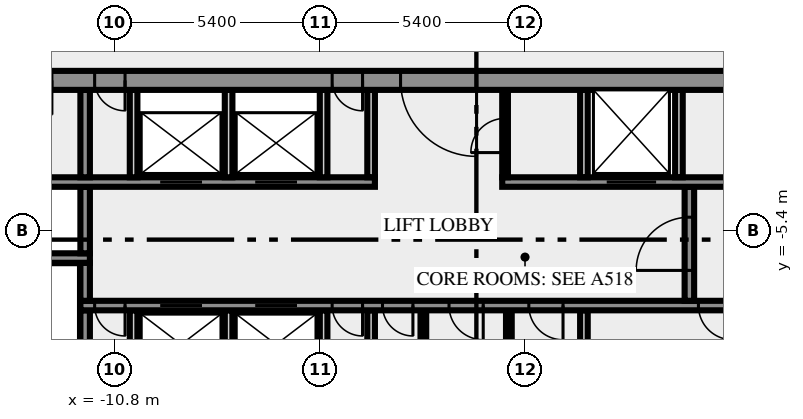
"""IFC4 building model, lengths in metres.
Left out: names, types, materials, properties, quantities, classifications, styles, units other than length and angle.
Written with IfcOpenShell. Run it as: python <this file> out.ifc"""

import sys

from ifc_helpers import new_model, si_unit, direction, frame, frame_2d, origin, place, context, subcontext, project, spatial, rectangle, extrude, element, fill, save


model = new_model("IFC4")
c1 = context("Model", 3, precision=1e-05, world=origin(), true_north=direction((0.0, 1.0)))
c2 = subcontext(c1, "Body", "Model", "MODEL_VIEW")
j1 = project(units=[si_unit("LENGTHUNIT", "METRE"), si_unit("PLANEANGLEUNIT", "RADIAN")], contexts=[c1])
p1 = place(None, origin())
s1 = spatial("IfcSite", under=j1, at=p1, CompositionType="ELEMENT")
p2 = place(p1, origin())
s2 = spatial("IfcBuilding", under=s1, at=p2, CompositionType="ELEMENT")
p3 = place(p2, frame((0.0, 0.0, 311.0)))
s3 = spatial("IfcBuildingStorey", under=s2, at=p3, CompositionType="ELEMENT", Elevation=311.0)
p4 = place(p3, frame((-11.575, -10.5, 0.0), z_axis=(0.0, 0.0, 1.0), x_axis=(0.0, 1.0, 0.0)))
e1 = element("IfcWall", 1, at=p4, inside=s3, PredefinedType="SHEAR", context=c2, shape_type="SweptSolid", body=[
    extrude(rectangle(XDim=3.0, YDim=0.25, at=frame_2d((1.5, 0.0))), origin(), (0.0, 0.0, 1.0), 3.65),
])
for number, where, z_axis, x_axis in (
    (2, (-10.3, -10.5, 0.0), (0.0, 0.0, 1.0), (0.0, 1.0, 0.0)),
    (3, (-7.8, -10.5, 0.0), (0.0, 0.0, 1.0), (0.0, 1.0, 0.0)),
    (4, (-5.3, -10.5, 0.0), (0.0, 0.0, 1.0), (0.0, 1.0, 0.0)),
    (5, (-4.05, -10.5, 0.0), (0.0, 0.0, 1.0), (0.0, 1.0, 0.0)),
):
    element("IfcWall", number, at=place(p3, frame(where, z_axis=z_axis, x_axis=x_axis)), inside=s3, PredefinedType="SOLIDWALL", context=c2, shape_type="SweptSolid", body=[
        extrude(rectangle(XDim=3.0, YDim=0.2, at=frame_2d((1.5, 0.0))), origin(), (0.0, 0.0, 1.0), 3.65),
    ])
for number, where, z_axis, x_axis in (
    (6, (-2.675, -10.5, 0.0), (0.0, 0.0, 1.0), (0.0, 1.0, 0.0)),
    (7, (-0.425, -10.5, 0.0), (0.0, 0.0, 1.0), (0.0, 1.0, 0.0)),
):
    element("IfcWall", number, at=place(p3, frame(where, z_axis=z_axis, x_axis=x_axis)), inside=s3, PredefinedType="PARTITIONING", context=c2, shape_type="SweptSolid", body=[
        extrude(rectangle(XDim=3.0, YDim=0.15, at=frame_2d((1.5, 0.0))), origin(), (0.0, 0.0, 1.0), 3.65),
    ])
p5 = place(p3, frame((1.55, -10.5, 0.0), z_axis=(0.0, 0.0, 1.0), x_axis=(0.0, 1.0, 0.0)))
e8 = element("IfcWall", 8, at=p5, inside=s3, PredefinedType="SOLIDWALL", context=c2, shape_type="SweptSolid", body=[
    extrude(rectangle(XDim=3.0, YDim=0.2, at=frame_2d((1.5, 0.0))), origin(), (0.0, 0.0, 1.0), 3.65),
])
p6 = place(p3, frame((11.7, -7.375, 0.0), z_axis=(0.0, 0.0, 1.0), x_axis=(-1.0, 0.0, 0.0)))
e9 = element("IfcWall", 9, at=p6, inside=s3, PredefinedType="SHEAR", context=c2, shape_type="SweptSolid", body=[
    extrude(rectangle(XDim=23.4, YDim=0.25, at=frame_2d((11.7, 0.0))), origin(), (0.0, 0.0, 1.0), 3.65),
])
p7 = place(p6, frame((22.225, 0.0, 0.0)))
e10 = element("IfcOpeningElement", 10, at=p7, cuts=e9, PredefinedType="OPENING", context=c2, shape_type="SweptSolid", body=[
    extrude(rectangle(XDim=0.8, YDim=2.1, at=frame_2d((0.4, 1.05))), frame((0.0, 0.135, 0.0), z_axis=(0.0, -1.0, 0.0), x_axis=(1.0, 0.0, 0.0)), (0.0, 0.0, 1.0), 0.27),
])
p8 = place(p6, frame((20.2, 0.0, 0.0)))
e11 = element("IfcOpeningElement", 11, at=p8, cuts=e9, PredefinedType="OPENING", context=c2, shape_type="SweptSolid", body=[
    extrude(rectangle(XDim=1.1, YDim=2.1, at=frame_2d((0.55, 1.05))), frame((0.0, 0.135, 0.0), z_axis=(0.0, -1.0, 0.0), x_axis=(1.0, 0.0, 0.0)), (0.0, 0.0, 1.0), 0.27),
])
p9 = place(p6, frame((17.7, 0.0, 0.0)))
e12 = element("IfcOpeningElement", 12, at=p9, cuts=e9, PredefinedType="OPENING", context=c2, shape_type="SweptSolid", body=[
    extrude(rectangle(XDim=1.1, YDim=2.1, at=frame_2d((0.55, 1.05))), frame((0.0, 0.135, 0.0), z_axis=(0.0, -1.0, 0.0), x_axis=(1.0, 0.0, 0.0)), (0.0, 0.0, 1.0), 0.27),
])
p10 = place(p6, frame((15.975, 0.0, 0.0)))
e13 = element("IfcOpeningElement", 13, at=p10, cuts=e9, PredefinedType="OPENING", context=c2, shape_type="SweptSolid", body=[
    extrude(rectangle(XDim=0.8, YDim=2.1, at=frame_2d((0.4, 1.05))), frame((0.0, 0.135, 0.0), z_axis=(0.0, -1.0, 0.0), x_axis=(1.0, 0.0, 0.0)), (0.0, 0.0, 1.0), 0.27),
])
p11 = place(p6, frame((14.65, 0.0, 0.0)))
e14 = element("IfcOpeningElement", 14, at=p11, cuts=e9, PredefinedType="OPENING", context=c2, shape_type="SweptSolid", body=[
    extrude(rectangle(XDim=0.8, YDim=2.1, at=frame_2d((0.4, 1.05))), frame((0.0, 0.135, 0.0), z_axis=(0.0, -1.0, 0.0), x_axis=(1.0, 0.0, 0.0)), (0.0, 0.0, 1.0), 0.27),
])
p12 = place(p6, frame((12.8, 0.0, 0.0)))
e15 = element("IfcOpeningElement", 15, at=p12, cuts=e9, PredefinedType="OPENING", context=c2, shape_type="SweptSolid", body=[
    extrude(rectangle(XDim=0.9, YDim=2.1, at=frame_2d((0.45, 1.05))), frame((0.0, 0.135, 0.0), z_axis=(0.0, -1.0, 0.0), x_axis=(1.0, 0.0, 0.0)), (0.0, 0.0, 1.0), 0.27),
])
p13 = place(p6, frame((10.7, 0.0, 0.0)))
e16 = element("IfcOpeningElement", 16, at=p13, cuts=e9, PredefinedType="OPENING", context=c2, shape_type="SweptSolid", body=[
    extrude(rectangle(XDim=0.9, YDim=2.1, at=frame_2d((0.45, 1.05))), frame((0.0, 0.135, 0.0), z_axis=(0.0, -1.0, 0.0), x_axis=(1.0, 0.0, 0.0)), (0.0, 0.0, 1.0), 0.27),
])
p14 = place(p6, frame((6.237, 0.0, 0.0)))
e17 = element("IfcOpeningElement", 17, at=p14, cuts=e9, PredefinedType="OPENING", context=c2, shape_type="SweptSolid", body=[
    extrude(rectangle(XDim=0.9, YDim=2.1, at=frame_2d((0.45, 1.05))), frame((0.0, 0.135, 0.0), z_axis=(0.0, -1.0, 0.0), x_axis=(1.0, 0.0, 0.0)), (0.0, 0.0, 1.0), 0.27),
])
p15 = place(p6, frame((1.263, 0.0, 0.0)))
e18 = element("IfcOpeningElement", 18, at=p15, cuts=e9, PredefinedType="OPENING", context=c2, shape_type="SweptSolid", body=[
    extrude(rectangle(XDim=0.9, YDim=2.1, at=frame_2d((0.45, 1.05))), frame((0.0, 0.135, 0.0), z_axis=(0.0, -1.0, 0.0), x_axis=(1.0, 0.0, 0.0)), (0.0, 0.0, 1.0), 0.27),
])
p16 = place(p3, frame((-11.575, -7.25, 0.0), z_axis=(0.0, 0.0, 1.0), x_axis=(0.0, 1.0, 0.0)))
e19 = element("IfcWall", 19, at=p16, inside=s3, PredefinedType="SHEAR", context=c2, shape_type="SweptSolid", body=[
    extrude(rectangle(XDim=1.0, YDim=0.25, at=frame_2d((0.5, 0.0))), origin(), (0.0, 0.0, 1.0), 3.65),
])
p17 = place(p3, frame((4.325, -7.25, 0.0), z_axis=(0.0, 0.0, 1.0), x_axis=(0.0, 1.0, 0.0)))
e20 = element("IfcWall", 20, at=p17, inside=s3, PredefinedType="SHEAR", context=c2, shape_type="SweptSolid", body=[
    extrude(rectangle(XDim=3.0, YDim=0.25, at=frame_2d((1.5, 0.0))), origin(), (0.0, 0.0, 1.0), 3.65),
])
p18 = place(p17, frame((0.8, 0.0, 0.0)))
e21 = element("IfcOpeningElement", 21, at=p18, cuts=e20, PredefinedType="OPENING", context=c2, shape_type="SweptSolid", body=[
    extrude(rectangle(XDim=1.4, YDim=2.1, at=frame_2d((0.7, 1.05))), frame((0.0, 0.135, 0.0), z_axis=(0.0, -1.0, 0.0), x_axis=(1.0, 0.0, 0.0)), (0.0, 0.0, 1.0), 0.27),
])
p19 = place(p3, frame((-11.45, -6.125, 0.0), z_axis=(0.0, 0.0, 1.0), x_axis=(-1.0, 0.0, 0.0)))
e22 = element("IfcWall", 22, at=p19, inside=s3, PredefinedType="SHEAR", context=c2, shape_type="SweptSolid", body=[
    extrude(rectangle(XDim=8.05, YDim=0.25, at=frame_2d((4.025, 0.0))), origin(), (0.0, 0.0, 1.0), 3.65),
])
p20 = place(p19, frame((6.2, 0.0, 0.0)))
e23 = element("IfcOpeningElement", 23, at=p20, cuts=e22, PredefinedType="OPENING", context=c2, shape_type="SweptSolid", body=[
    extrude(rectangle(XDim=1.8, YDim=2.1, at=frame_2d((0.9, 1.05))), frame((0.0, 0.135, 0.0), z_axis=(0.0, -1.0, 0.0), x_axis=(1.0, 0.0, 0.0)), (0.0, 0.0, 1.0), 0.27),
])
p21 = place(p3, frame((-11.575, -6.0, 0.0), z_axis=(0.0, 0.0, 1.0), x_axis=(0.0, 1.0, 0.0)))
e24 = element("IfcWall", 24, at=p21, inside=s3, PredefinedType="SHEAR", context=c2, shape_type="SweptSolid", body=[
    extrude(rectangle(XDim=1.75, YDim=0.25, at=frame_2d((0.875, 0.0))), origin(), (0.0, 0.0, 1.0), 3.65),
])
p22 = place(p3, frame((-14.35, -4.125, 0.0), z_axis=(0.0, 0.0, 1.0), x_axis=(1.0, 0.0, 0.0)))
e25 = element("IfcWall", 25, at=p22, inside=s3, PredefinedType="SHEAR", context=c2, shape_type="SweptSolid", body=[
    extrude(rectangle(XDim=10.4, YDim=0.25, at=frame_2d((5.2, 0.0))), origin(), (0.0, 0.0, 1.0), 3.65),
])
p23 = place(p22, frame((4.75, 0.0, 0.0)))
e26 = element("IfcOpeningElement", 26, at=p23, cuts=e25, PredefinedType="OPENING", context=c2, shape_type="SweptSolid", body=[
    extrude(rectangle(XDim=1.1, YDim=2.1, at=frame_2d((0.55, 1.05))), frame((0.0, 0.135, 0.0), z_axis=(0.0, -1.0, 0.0), x_axis=(1.0, 0.0, 0.0)), (0.0, 0.0, 1.0), 0.27),
])
p24 = place(p22, frame((7.25, 0.0, 0.0)))
e27 = element("IfcOpeningElement", 27, at=p24, cuts=e25, PredefinedType="OPENING", context=c2, shape_type="SweptSolid", body=[
    extrude(rectangle(XDim=1.1, YDim=2.1, at=frame_2d((0.55, 1.05))), frame((0.0, 0.135, 0.0), z_axis=(0.0, -1.0, 0.0), x_axis=(1.0, 0.0, 0.0)), (0.0, 0.0, 1.0), 0.27),
])
p25 = place(p3, frame((-0.6, -4.125, 0.0), z_axis=(0.0, 0.0, 1.0), x_axis=(1.0, 0.0, 0.0)))
e28 = element("IfcWall", 28, at=p25, inside=s3, PredefinedType="SHEAR", context=c2, shape_type="SweptSolid", body=[
    extrude(rectangle(XDim=14.95, YDim=0.25, at=frame_2d((7.475, 0.0))), origin(), (0.0, 0.0, 1.0), 3.65),
])
p26 = place(p25, frame((2.75, 0.0, 0.0)))
e29 = element("IfcOpeningElement", 29, at=p26, cuts=e28, PredefinedType="OPENING", context=c2, shape_type="SweptSolid", body=[
    extrude(rectangle(XDim=1.3, YDim=2.1, at=frame_2d((0.65, 1.05))), frame((0.0, 0.135, 0.0), z_axis=(0.0, -1.0, 0.0), x_axis=(1.0, 0.0, 0.0)), (0.0, 0.0, 1.0), 0.27),
])
p27 = place(p3, frame((-11.575, -4.0, 0.0), z_axis=(0.0, 0.0, 1.0), x_axis=(0.0, 1.0, 0.0)))
e30 = element("IfcWall", 30, at=p27, inside=s3, PredefinedType="SHEAR", context=c2, shape_type="SweptSolid", body=[
    extrude(rectangle(XDim=2.3, YDim=0.25, at=frame_2d((1.15, 0.0))), origin(), (0.0, 0.0, 1.0), 3.65),
])
for number, where, z_axis, x_axis in (
    (31, (-10.3, -4.0, 0.0), (0.0, 0.0, 1.0), (0.0, 1.0, 0.0)),
    (32, (-7.8, -4.0, 0.0), (0.0, 0.0, 1.0), (0.0, 1.0, 0.0)),
    (33, (-5.3, -4.0, 0.0), (0.0, 0.0, 1.0), (0.0, 1.0, 0.0)),
    (34, (-4.05, -4.0, 0.0), (0.0, 0.0, 1.0), (0.0, 1.0, 0.0)),
):
    element("IfcWall", number, at=place(p3, frame(where, z_axis=z_axis, x_axis=x_axis)), inside=s3, PredefinedType="SOLIDWALL", context=c2, shape_type="SweptSolid", body=[
        extrude(rectangle(XDim=2.3, YDim=0.2, at=frame_2d((1.15, 0.0))), origin(), (0.0, 0.0, 1.0), 3.65),
    ])
p28 = place(p3, frame((-0.525, -4.0, 0.0), z_axis=(0.0, 0.0, 1.0), x_axis=(0.0, 1.0, 0.0)))
e35 = element("IfcWall", 35, at=p28, inside=s3, PredefinedType="PARTITIONING", context=c2, shape_type="SweptSolid", body=[
    extrude(rectangle(XDim=2.3, YDim=0.15, at=frame_2d((1.15, 0.0))), origin(), (0.0, 0.0, 1.0), 3.65),
])
p29 = place(p28, frame((0.65, 0.0, 0.0)))
e36 = element("IfcOpeningElement", 36, at=p29, cuts=e35, PredefinedType="OPENING", context=c2, shape_type="SweptSolid", body=[
    extrude(rectangle(XDim=0.9, YDim=2.1, at=frame_2d((0.45, 1.05))), frame((0.0, 0.085, 0.0), z_axis=(0.0, -1.0, 0.0), x_axis=(1.0, 0.0, 0.0)), (0.0, 0.0, 1.0), 0.17),
])
for number, where, z_axis, x_axis in (
    (37, (1.55, -4.0, 0.0), (0.0, 0.0, 1.0), (0.0, 1.0, 0.0)),
    (38, (4.05, -4.0, 0.0), (0.0, 0.0, 1.0), (0.0, 1.0, 0.0)),
):
    element("IfcWall", number, at=place(p3, frame(where, z_axis=z_axis, x_axis=x_axis)), inside=s3, PredefinedType="SOLIDWALL", context=c2, shape_type="SweptSolid", body=[
        extrude(rectangle(XDim=2.3, YDim=0.2, at=frame_2d((1.15, 0.0))), origin(), (0.0, 0.0, 1.0), 3.65),
    ])
p30 = place(p3, frame((20.49, -1.45, 0.0), z_axis=(0.0, 0.0, 1.0), x_axis=(-1.0, 0.0, 0.0)))
e39 = element("IfcWall", 39, at=p30, inside=s3, PredefinedType="SHEAR", context=c2, shape_type="SweptSolid", body=[
    extrude(rectangle(XDim=40.98, YDim=0.5, at=frame_2d((20.49, 0.0))), origin(), (0.0, 0.0, 1.0), 3.65),
])
p31 = place(p30, frame((38.14, 0.0, 0.0)))
e40 = element("IfcOpeningElement", 40, at=p31, cuts=e39, PredefinedType="OPENING", context=c2, shape_type="SweptSolid", body=[
    extrude(rectangle(XDim=1.8, YDim=2.1, at=frame_2d((0.9, 1.05))), frame((0.0, 0.26, 0.0), z_axis=(0.0, -1.0, 0.0), x_axis=(1.0, 0.0, 0.0)), (0.0, 0.0, 1.0), 0.52),
])
p32 = place(p30, frame((35.89, 0.0, 0.0)))
e41 = element("IfcOpeningElement", 41, at=p32, cuts=e39, PredefinedType="OPENING", context=c2, shape_type="SweptSolid", body=[
    extrude(rectangle(XDim=0.9, YDim=2.1, at=frame_2d((0.45, 1.05))), frame((0.0, 0.26, 0.0), z_axis=(0.0, -1.0, 0.0), x_axis=(1.0, 0.0, 0.0)), (0.0, 0.0, 1.0), 0.52),
])
p33 = place(p30, frame((32.94, 0.0, 0.0)))
e42 = element("IfcOpeningElement", 42, at=p33, cuts=e39, PredefinedType="OPENING", context=c2, shape_type="SweptSolid", body=[
    extrude(rectangle(XDim=0.9, YDim=2.1, at=frame_2d((0.45, 1.05))), frame((0.0, 0.26, 0.0), z_axis=(0.0, -1.0, 0.0), x_axis=(1.0, 0.0, 0.0)), (0.0, 0.0, 1.0), 0.52),
])
p34 = place(p30, frame((31.015, 0.0, 0.0)))
e43 = element("IfcOpeningElement", 43, at=p34, cuts=e39, PredefinedType="OPENING", context=c2, shape_type="SweptSolid", body=[
    extrude(rectangle(XDim=0.8, YDim=2.1, at=frame_2d((0.4, 1.05))), frame((0.0, 0.26, 0.0), z_axis=(0.0, -1.0, 0.0), x_axis=(1.0, 0.0, 0.0)), (0.0, 0.0, 1.0), 0.52),
])
p35 = place(p30, frame((24.765, 0.0, 0.0)))
e44 = element("IfcOpeningElement", 44, at=p35, cuts=e39, PredefinedType="OPENING", context=c2, shape_type="SweptSolid", body=[
    extrude(rectangle(XDim=0.8, YDim=2.1, at=frame_2d((0.4, 1.05))), frame((0.0, 0.26, 0.0), z_axis=(0.0, -1.0, 0.0), x_axis=(1.0, 0.0, 0.0)), (0.0, 0.0, 1.0), 0.52),
])
p36 = place(p30, frame((21.765, 0.0, 0.0)))
e45 = element("IfcOpeningElement", 45, at=p36, cuts=e39, PredefinedType="OPENING", context=c2, shape_type="SweptSolid", body=[
    extrude(rectangle(XDim=2.0, YDim=2.1, at=frame_2d((1.0, 1.05))), frame((0.0, 0.26, 0.0), z_axis=(0.0, -1.0, 0.0), x_axis=(1.0, 0.0, 0.0)), (0.0, 0.0, 1.0), 0.52),
])
p37 = place(p30, frame((12.24, 0.0, 0.0)))
e46 = element("IfcOpeningElement", 46, at=p37, cuts=e39, PredefinedType="OPENING", context=c2, shape_type="SweptSolid", body=[
    extrude(rectangle(XDim=0.9, YDim=2.1, at=frame_2d((0.45, 1.05))), frame((0.0, 0.26, 0.0), z_axis=(0.0, -1.0, 0.0), x_axis=(1.0, 0.0, 0.0)), (0.0, 0.0, 1.0), 0.52),
])
p38 = place(p30, frame((7.14, 0.0, 0.0)))
e47 = element("IfcOpeningElement", 47, at=p38, cuts=e39, PredefinedType="OPENING", context=c2, shape_type="SweptSolid", body=[
    extrude(rectangle(XDim=0.9, YDim=2.1, at=frame_2d((0.45, 1.05))), frame((0.0, 0.26, 0.0), z_axis=(0.0, -1.0, 0.0), x_axis=(1.0, 0.0, 0.0)), (0.0, 0.0, 1.0), 0.52),
])
p39 = place(p30, frame((5.028, 0.0, 0.0)))
e48 = element("IfcOpeningElement", 48, at=p39, cuts=e39, PredefinedType="OPENING", context=c2, shape_type="SweptSolid", body=[
    extrude(rectangle(XDim=0.8, YDim=2.1, at=frame_2d((0.4, 1.05))), frame((0.0, 0.26, 0.0), z_axis=(0.0, -1.0, 0.0), x_axis=(1.0, 0.0, 0.0)), (0.0, 0.0, 1.0), 0.52),
])
p40 = place(p30, frame((3.452, 0.0, 0.0)))
e49 = element("IfcOpeningElement", 49, at=p40, cuts=e39, PredefinedType="OPENING", context=c2, shape_type="SweptSolid", body=[
    extrude(rectangle(XDim=0.8, YDim=2.1, at=frame_2d((0.4, 1.05))), frame((0.0, 0.26, 0.0), z_axis=(0.0, -1.0, 0.0), x_axis=(1.0, 0.0, 0.0)), (0.0, 0.0, 1.0), 0.52),
])
p41 = place(p30, frame((1.04, 0.0, 0.0)))
e50 = element("IfcOpeningElement", 50, at=p41, cuts=e39, PredefinedType="OPENING", context=c2, shape_type="SweptSolid", body=[
    extrude(rectangle(XDim=1.8, YDim=2.1, at=frame_2d((0.9, 1.05))), frame((0.0, 0.26, 0.0), z_axis=(0.0, -1.0, 0.0), x_axis=(1.0, 0.0, 0.0)), (0.0, 0.0, 1.0), 0.52),
])
p42 = place(p7, origin())
e51 = element("IfcDoor", 51, at=p42, inside=s3, OperationType="SINGLE_SWING_RIGHT", PredefinedType="DOOR", context=c2, shape_type="SweptSolid", body=[
    extrude(rectangle(XDim=0.8, YDim=2.1, at=frame_2d((0.4, 1.05))), frame((0.0, 0.025, 0.0), z_axis=(0.0, -1.0, 0.0), x_axis=(1.0, 0.0, 0.0)), (0.0, 0.0, 1.0), 0.05),
])
fill(e10, e51)
p43 = place(p8, origin())
e52 = element("IfcDoor", 52, at=p43, inside=s3, OperationType="DOUBLE_DOOR_SLIDING", PredefinedType="DOOR", context=c2, shape_type="SweptSolid", body=[
    extrude(rectangle(XDim=1.1, YDim=2.1, at=frame_2d((0.55, 1.05))), frame((0.0, 0.025, 0.0), z_axis=(0.0, -1.0, 0.0), x_axis=(1.0, 0.0, 0.0)), (0.0, 0.0, 1.0), 0.05),
])
fill(e11, e52)
p44 = place(p9, origin())
e53 = element("IfcDoor", 53, at=p44, inside=s3, OperationType="DOUBLE_DOOR_SLIDING", PredefinedType="DOOR", context=c2, shape_type="SweptSolid", body=[
    extrude(rectangle(XDim=1.1, YDim=2.1, at=frame_2d((0.55, 1.05))), frame((0.0, 0.025, 0.0), z_axis=(0.0, -1.0, 0.0), x_axis=(1.0, 0.0, 0.0)), (0.0, 0.0, 1.0), 0.05),
])
fill(e12, e53)
p45 = place(p10, origin())
e54 = element("IfcDoor", 54, at=p45, inside=s3, OperationType="SINGLE_SWING_RIGHT", PredefinedType="DOOR", context=c2, shape_type="SweptSolid", body=[
    extrude(rectangle(XDim=0.8, YDim=2.1, at=frame_2d((0.4, 1.05))), frame((0.0, 0.025, 0.0), z_axis=(0.0, -1.0, 0.0), x_axis=(1.0, 0.0, 0.0)), (0.0, 0.0, 1.0), 0.05),
])
fill(e13, e54)
p46 = place(p11, origin())
e55 = element("IfcDoor", 55, at=p46, inside=s3, OperationType="SINGLE_SWING_RIGHT", PredefinedType="DOOR", context=c2, shape_type="SweptSolid", body=[
    extrude(rectangle(XDim=0.8, YDim=2.1, at=frame_2d((0.4, 1.05))), frame((0.0, 0.025, 0.0), z_axis=(0.0, -1.0, 0.0), x_axis=(1.0, 0.0, 0.0)), (0.0, 0.0, 1.0), 0.05),
])
fill(e14, e55)
p47 = place(p12, origin())
e56 = element("IfcDoor", 56, at=p47, inside=s3, OperationType="SINGLE_SWING_RIGHT", PredefinedType="DOOR", context=c2, shape_type="SweptSolid", body=[
    extrude(rectangle(XDim=0.9, YDim=2.1, at=frame_2d((0.45, 1.05))), frame((0.0, 0.025, 0.0), z_axis=(0.0, -1.0, 0.0), x_axis=(1.0, 0.0, 0.0)), (0.0, 0.0, 1.0), 0.05),
])
fill(e15, e56)
p48 = place(p13, origin())
e57 = element("IfcDoor", 57, at=p48, inside=s3, OperationType="SINGLE_SWING_LEFT", PredefinedType="DOOR", context=c2, shape_type="SweptSolid", body=[
    extrude(rectangle(XDim=0.9, YDim=2.1, at=frame_2d((0.45, 1.05))), frame((0.0, 0.025, 0.0), z_axis=(0.0, -1.0, 0.0), x_axis=(1.0, 0.0, 0.0)), (0.0, 0.0, 1.0), 0.05),
])
fill(e16, e57)
p49 = place(p14, origin())
e58 = element("IfcDoor", 58, at=p49, inside=s3, OperationType="SINGLE_SWING_LEFT", PredefinedType="DOOR", context=c2, shape_type="SweptSolid", body=[
    extrude(rectangle(XDim=0.9, YDim=2.1, at=frame_2d((0.45, 1.05))), frame((0.0, 0.025, 0.0), z_axis=(0.0, -1.0, 0.0), x_axis=(1.0, 0.0, 0.0)), (0.0, 0.0, 1.0), 0.05),
])
fill(e17, e58)
p50 = place(p18, origin())
e59 = element("IfcDoor", 59, at=p50, inside=s3, OperationType="DOUBLE_DOOR_SINGLE_SWING", PredefinedType="DOOR", context=c2, shape_type="SweptSolid", body=[
    extrude(rectangle(XDim=1.4, YDim=2.1, at=frame_2d((0.7, 1.05))), frame((0.0, 0.025, 0.0), z_axis=(0.0, -1.0, 0.0), x_axis=(1.0, 0.0, 0.0)), (0.0, 0.0, 1.0), 0.05),
])
fill(e21, e59)
p51 = place(p23, origin())
e60 = element("IfcDoor", 60, at=p51, inside=s3, OperationType="DOUBLE_DOOR_SLIDING", PredefinedType="DOOR", context=c2, shape_type="SweptSolid", body=[
    extrude(rectangle(XDim=1.1, YDim=2.1, at=frame_2d((0.55, 1.05))), frame((0.0, 0.025, 0.0), z_axis=(0.0, -1.0, 0.0), x_axis=(1.0, 0.0, 0.0)), (0.0, 0.0, 1.0), 0.05),
])
fill(e26, e60)
p52 = place(p24, origin())
e61 = element("IfcDoor", 61, at=p52, inside=s3, OperationType="DOUBLE_DOOR_SLIDING", PredefinedType="DOOR", context=c2, shape_type="SweptSolid", body=[
    extrude(rectangle(XDim=1.1, YDim=2.1, at=frame_2d((0.55, 1.05))), frame((0.0, 0.025, 0.0), z_axis=(0.0, -1.0, 0.0), x_axis=(1.0, 0.0, 0.0)), (0.0, 0.0, 1.0), 0.05),
])
fill(e27, e61)
p53 = place(p26, origin())
e62 = element("IfcDoor", 62, at=p53, inside=s3, OperationType="DOUBLE_DOOR_SLIDING", PredefinedType="DOOR", context=c2, shape_type="SweptSolid", body=[
    extrude(rectangle(XDim=1.3, YDim=2.1, at=frame_2d((0.65, 1.05))), frame((0.0, 0.025, 0.0), z_axis=(0.0, -1.0, 0.0), x_axis=(1.0, 0.0, 0.0)), (0.0, 0.0, 1.0), 0.05),
])
fill(e29, e62)
p54 = place(p29, origin())
e63 = element("IfcDoor", 63, at=p54, inside=s3, OperationType="SINGLE_SWING_LEFT", PredefinedType="DOOR", context=c2, shape_type="SweptSolid", body=[
    extrude(rectangle(XDim=0.9, YDim=2.1, at=frame_2d((0.45, 1.05))), frame((0.0, 0.025, 0.0), z_axis=(0.0, -1.0, 0.0), x_axis=(1.0, 0.0, 0.0)), (0.0, 0.0, 1.0), 0.05),
])
fill(e36, e63)
p55 = place(p34, origin())
e64 = element("IfcDoor", 64, at=p55, inside=s3, OperationType="SINGLE_SWING_RIGHT", PredefinedType="DOOR", context=c2, shape_type="SweptSolid", body=[
    extrude(rectangle(XDim=0.8, YDim=2.1, at=frame_2d((0.4, 1.05))), frame((0.0, 0.025, 0.0), z_axis=(0.0, -1.0, 0.0), x_axis=(1.0, 0.0, 0.0)), (0.0, 0.0, 1.0), 0.05),
])
fill(e43, e64)
p56 = place(p35, origin())
e65 = element("IfcDoor", 65, at=p56, inside=s3, OperationType="SINGLE_SWING_RIGHT", PredefinedType="DOOR", context=c2, shape_type="SweptSolid", body=[
    extrude(rectangle(XDim=0.8, YDim=2.1, at=frame_2d((0.4, 1.05))), frame((0.0, 0.025, 0.0), z_axis=(0.0, -1.0, 0.0), x_axis=(1.0, 0.0, 0.0)), (0.0, 0.0, 1.0), 0.05),
])
fill(e44, e65)
p57 = place(p36, origin())
e66 = element("IfcDoor", 66, at=p57, inside=s3, OperationType="DOUBLE_DOOR_SINGLE_SWING", PredefinedType="DOOR", context=c2, shape_type="SweptSolid", body=[
    extrude(rectangle(XDim=2.0, YDim=2.1, at=frame_2d((1.0, 1.05))), frame((0.0, 0.025, 0.0), z_axis=(0.0, -1.0, 0.0), x_axis=(1.0, 0.0, 0.0)), (0.0, 0.0, 1.0), 0.05),
])
fill(e45, e66)
save(model, sys.argv[1])
